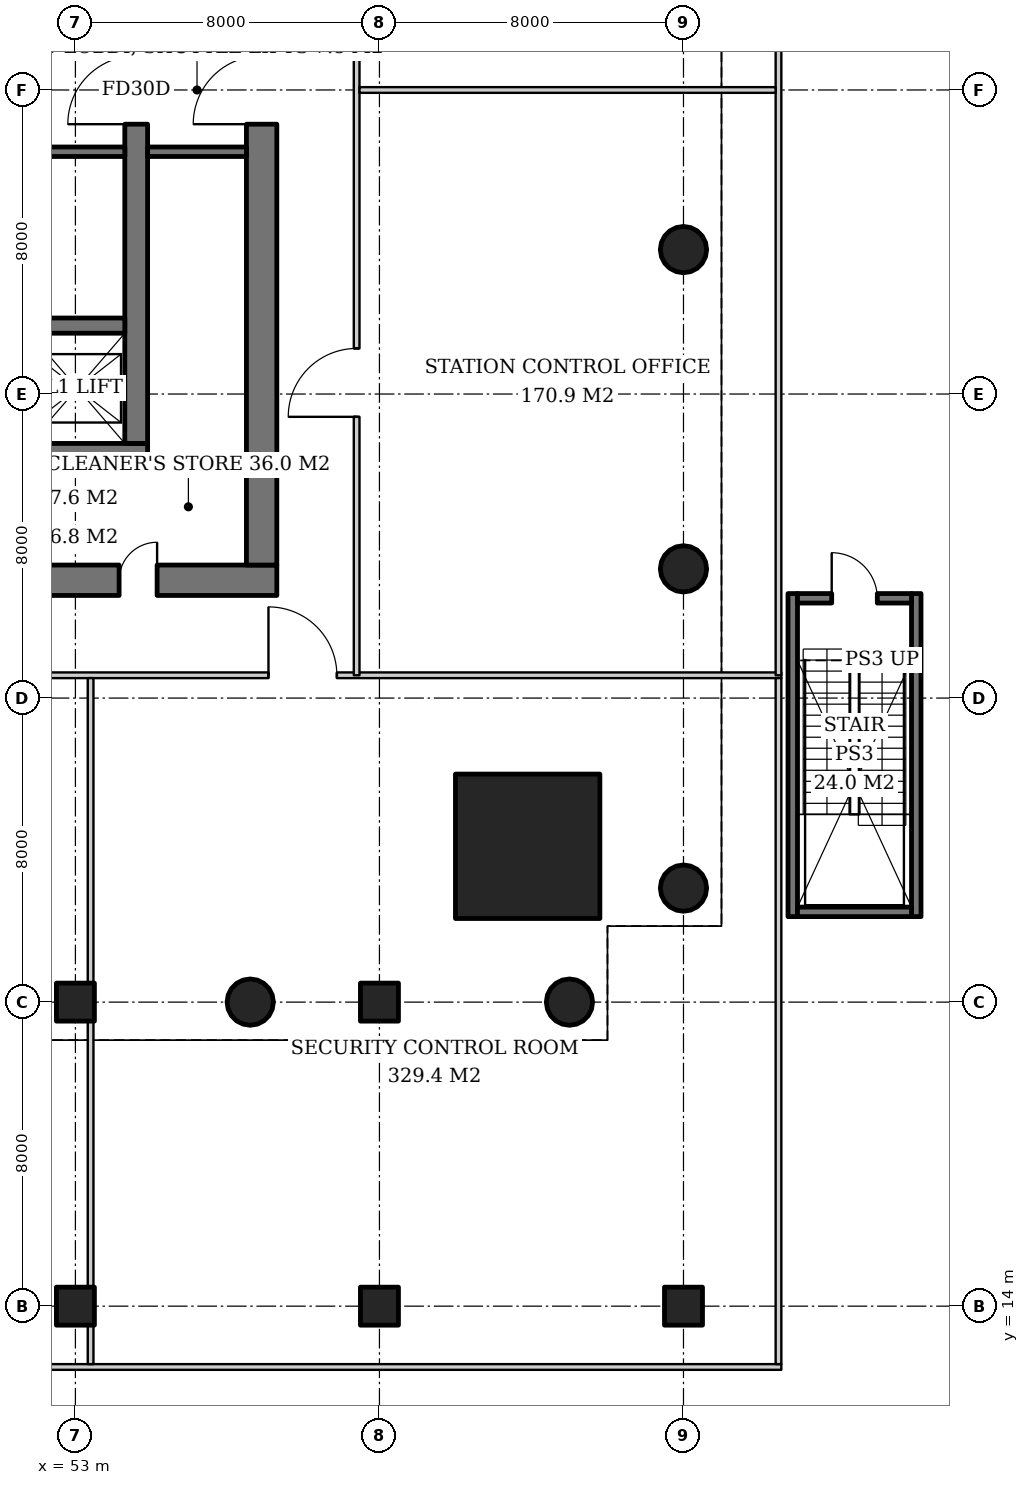
"""IFC4 building model, lengths in metres.
Left out: names, types, materials, properties, quantities, classifications, styles, units other than length and angle.
Written with IfcOpenShell. Run it as: python <this file> out.ifc"""

import sys

from ifc_helpers import new_model, si_unit, direction, frame, frame_2d, origin, origin_2d, place, context, subcontext, project, spatial, rectangle, hollow_circle, extrude, element, fill, save


model = new_model("IFC4")
c1 = context("Model", 3, precision=1e-05, world=origin(), true_north=direction((0.0, 1.0)))
c2 = subcontext(c1, "Body", "Model", "MODEL_VIEW")
j1 = project(units=[si_unit("LENGTHUNIT", "METRE"), si_unit("PLANEANGLEUNIT", "RADIAN")], contexts=[c1])
p1 = place(None, origin())
s1 = spatial("IfcSite", under=j1, at=p1, CompositionType="ELEMENT")
p2 = place(p1, origin())
s2 = spatial("IfcBuilding", under=s1, at=p2, CompositionType="ELEMENT")
p3 = place(p2, frame((0.0, 0.0, -5.0)))
s3 = spatial("IfcBuildingStorey", under=s2, at=p3, CompositionType="ELEMENT", Elevation=-5.0)
for number, where, z_axis, x_axis in (
    (1, (53.0, 14.0, 0.0), (0.0, 0.0, 1.0), (1.0, 0.0, 0.0)),
    (2, (61.0, 14.0, 0.0), (0.0, 0.0, 1.0), (1.0, 0.0, 0.0)),
    (3, (69.0, 14.0, 0.0), (0.0, 0.0, 1.0), (1.0, 0.0, 0.0)),
):
    element("IfcColumn", number, at=place(p3, frame(where, z_axis=z_axis, x_axis=x_axis)), inside=s3, PredefinedType="COLUMN", context=c2, shape_type="SweptSolid", body=[
        extrude(rectangle(XDim=1.0, YDim=1.0, at=origin_2d()), origin(), (0.0, 0.0, 1.0), 5.0),
    ])
for number, where, z_axis, x_axis in (
    (4, (69.0, 25.0, 0.0), (0.0, 0.0, 1.0), (1.0, 0.0, 0.0)),
    (5, (69.0, 33.4, 0.0), (0.0, 0.0, 1.0), (1.0, 0.0, 0.0)),
    (6, (69.0, 41.8, 0.0), (0.0, 0.0, 1.0), (1.0, 0.0, 0.0)),
):
    element("IfcColumn", number, at=place(p3, frame(where, z_axis=z_axis, x_axis=x_axis)), inside=s3, PredefinedType="COLUMN", context=c2, shape_type="SweptSolid", body=[
        extrude(hollow_circle(Radius=0.61, WallThickness=0.04, at=origin_2d()), origin(), (0.0, 0.0, 1.0), 5.0),
    ])
p4 = place(p3, frame((64.9, 26.1, 0.0), z_axis=(0.0, 0.0, 1.0), x_axis=(1.0, 0.0, 0.0)))
e7 = element("IfcColumn", 7, at=p4, inside=s3, PredefinedType="COLUMN", context=c2, shape_type="SweptSolid", body=[
    extrude(rectangle(XDim=3.8, YDim=3.8, at=origin_2d()), origin(), (0.0, 0.0, 1.0), 5.0),
])
for number, where, z_axis, x_axis in (
    (8, (66.0, 22.0, 0.0), (0.0, 0.0, 1.0), (1.0, 0.0, 0.0)),
    (9, (57.6, 22.0, 0.0), (0.0, 0.0, 1.0), (1.0, 0.0, 0.0)),
):
    element("IfcColumn", number, at=place(p3, frame(where, z_axis=z_axis, x_axis=x_axis)), inside=s3, PredefinedType="COLUMN", context=c2, shape_type="SweptSolid", body=[
        extrude(hollow_circle(Radius=0.61, WallThickness=0.04, at=origin_2d()), origin(), (0.0, 0.0, 1.0), 5.0),
    ])
p5 = place(p3, frame((35.1, 36.4, 0.0), z_axis=(0.0, 0.0, 1.0), x_axis=(1.0, 0.0, 0.0)))
e10 = element("IfcWall", 10, at=p5, inside=s3, PredefinedType="SHEAR", context=c2, shape_type="SweptSolid", body=[
    extrude(rectangle(XDim=19.8, YDim=0.6, at=frame_2d((9.9, 0.0))), origin(), (0.0, 0.0, 1.0), 5.0),
])
p6 = place(p5, frame((3.9, 0.0, 0.0)))
e11 = element("IfcOpeningElement", 11, at=p6, cuts=e10, PredefinedType="OPENING", context=c2, shape_type="SweptSolid", body=[
    extrude(rectangle(XDim=1.0, YDim=2.1, at=frame_2d((0.5, 1.05))), frame((0.0, 0.31, 0.0), z_axis=(0.0, -1.0, 0.0), x_axis=(1.0, 0.0, 0.0)), (0.0, 0.0, 1.0), 0.62),
])
p7 = place(p5, frame((15.35, 0.0, 0.0)))
e12 = element("IfcOpeningElement", 12, at=p7, cuts=e10, PredefinedType="OPENING", context=c2, shape_type="SweptSolid", body=[
    extrude(rectangle(XDim=1.0, YDim=2.1, at=frame_2d((0.5, 1.05))), frame((0.0, 0.31, 0.0), z_axis=(0.0, -1.0, 0.0), x_axis=(1.0, 0.0, 0.0)), (0.0, 0.0, 1.0), 0.62),
])
p8 = place(p3, frame((54.6, 36.7, 0.0), z_axis=(0.0, 0.0, 1.0), x_axis=(0.0, 1.0, 0.0)))
e13 = element("IfcWall", 13, at=p8, inside=s3, PredefinedType="SHEAR", context=c2, shape_type="SweptSolid", body=[
    extrude(rectangle(XDim=18.6, YDim=0.6, at=frame_2d((9.3, 0.0))), origin(), (0.0, 0.0, 1.0), 5.0),
])
p9 = place(p8, frame((8.4, 0.0, 0.0)))
e14 = element("IfcOpeningElement", 14, at=p9, cuts=e13, PredefinedType="OPENING", context=c2, shape_type="SweptSolid", body=[
    extrude(rectangle(XDim=1.8, YDim=2.4, at=frame_2d((0.9, 1.2))), frame((0.0, 0.31, 0.0), z_axis=(0.0, -1.0, 0.0), x_axis=(1.0, 0.0, 0.0)), (0.0, 0.0, 1.0), 0.62),
])
p10 = place(p3, frame((31.7, 33.1, 0.0), z_axis=(0.0, 0.0, 1.0), x_axis=(1.0, 0.0, 0.0)))
e15 = element("IfcWall", 15, at=p10, inside=s3, PredefinedType="SHEAR", context=c2, shape_type="SweptSolid", body=[
    extrude(rectangle(XDim=26.6, YDim=0.8, at=frame_2d((13.3, 0.0))), origin(), (0.0, 0.0, 1.0), 5.0),
])
p11 = place(p10, frame((7.3, 0.0, 0.0)))
e16 = element("IfcOpeningElement", 16, at=p11, cuts=e15, PredefinedType="OPENING", context=c2, shape_type="SweptSolid", body=[
    extrude(rectangle(XDim=1.0, YDim=2.1, at=frame_2d((0.5, 1.05))), frame((0.0, 0.41, 0.0), z_axis=(0.0, -1.0, 0.0), x_axis=(1.0, 0.0, 0.0)), (0.0, 0.0, 1.0), 0.82),
])
p12 = place(p10, frame((18.75, 0.0, 0.0)))
e17 = element("IfcOpeningElement", 17, at=p12, cuts=e15, PredefinedType="OPENING", context=c2, shape_type="SweptSolid", body=[
    extrude(rectangle(XDim=1.0, YDim=2.1, at=frame_2d((0.5, 1.05))), frame((0.0, 0.41, 0.0), z_axis=(0.0, -1.0, 0.0), x_axis=(1.0, 0.0, 0.0)), (0.0, 0.0, 1.0), 0.82),
])
p13 = place(p10, frame((3.25, 0.0, 0.0)))
e18 = element("IfcOpeningElement", 18, at=p13, cuts=e15, PredefinedType="OPENING", context=c2, shape_type="SweptSolid", body=[
    extrude(rectangle(XDim=1.0, YDim=2.1, at=frame_2d((0.5, 1.05))), frame((0.0, 0.41, 0.0), z_axis=(0.0, -1.0, 0.0), x_axis=(1.0, 0.0, 0.0)), (0.0, 0.0, 1.0), 0.82),
])
p14 = place(p10, frame((10.42, 0.0, 0.0)))
e19 = element("IfcOpeningElement", 19, at=p14, cuts=e15, PredefinedType="OPENING", context=c2, shape_type="SweptSolid", body=[
    extrude(rectangle(XDim=1.0, YDim=2.1, at=frame_2d((0.5, 1.05))), frame((0.0, 0.41, 0.0), z_axis=(0.0, -1.0, 0.0), x_axis=(1.0, 0.0, 0.0)), (0.0, 0.0, 1.0), 0.82),
])
p15 = place(p10, frame((14.46, 0.0, 0.0)))
e20 = element("IfcOpeningElement", 20, at=p15, cuts=e15, PredefinedType="OPENING", context=c2, shape_type="SweptSolid", body=[
    extrude(rectangle(XDim=1.0, YDim=2.1, at=frame_2d((0.5, 1.05))), frame((0.0, 0.41, 0.0), z_axis=(0.0, -1.0, 0.0), x_axis=(1.0, 0.0, 0.0)), (0.0, 0.0, 1.0), 0.82),
])
p16 = place(p10, frame((22.45, 0.0, 0.0)))
e21 = element("IfcOpeningElement", 21, at=p16, cuts=e15, PredefinedType="OPENING", context=c2, shape_type="SweptSolid", body=[
    extrude(rectangle(XDim=1.0, YDim=2.1, at=frame_2d((0.5, 1.05))), frame((0.0, 0.41, 0.0), z_axis=(0.0, -1.0, 0.0), x_axis=(1.0, 0.0, 0.0)), (0.0, 0.0, 1.0), 0.82),
])
p17 = place(p3, frame((57.9, 33.5, 0.0), z_axis=(0.0, 0.0, 1.0), x_axis=(0.0, 1.0, 0.0)))
e22 = element("IfcWall", 22, at=p17, inside=s3, PredefinedType="SHEAR", context=c2, shape_type="SweptSolid", body=[
    extrude(rectangle(XDim=25.0, YDim=0.8, at=frame_2d((12.5, 0.0))), origin(), (0.0, 0.0, 1.0), 5.0),
])
p18 = place(p17, frame((11.6, 0.0, 0.0)))
e23 = element("IfcOpeningElement", 23, at=p18, cuts=e22, PredefinedType="OPENING", context=c2, shape_type="SweptSolid", body=[
    extrude(rectangle(XDim=1.8, YDim=2.4, at=frame_2d((0.9, 1.2))), frame((0.0, 0.41, 0.0), z_axis=(0.0, -1.0, 0.0), x_axis=(1.0, 0.0, 0.0)), (0.0, 0.0, 1.0), 0.82),
])
p19 = place(p3, frame((35.7, 39.8, 0.0), z_axis=(0.0, 0.0, 1.0), x_axis=(1.0, 0.0, 0.0)))
e24 = element("IfcWall", 24, at=p19, inside=s3, PredefinedType="SHEAR", context=c2, shape_type="SweptSolid", body=[
    extrude(rectangle(XDim=18.6, YDim=0.4, at=frame_2d((9.3, 0.0))), origin(), (0.0, 0.0, 1.0), 5.0),
])
for number, where, z_axis, x_axis in (
    (25, (53.0, 22.0, 0.0), (0.0, 0.0, 1.0), (1.0, 0.0, 0.0)),
    (26, (61.0, 22.0, 0.0), (0.0, 0.0, 1.0), (1.0, 0.0, 0.0)),
):
    element("IfcColumn", number, at=place(p3, frame(where, z_axis=z_axis, x_axis=x_axis)), inside=s3, PredefinedType="COLUMN", context=c2, shape_type="SweptSolid", body=[
        extrude(rectangle(XDim=1.0, YDim=1.0, at=origin_2d()), origin(), (0.0, 0.0, 1.0), 5.0),
    ])
p20 = place(p3, frame((48.93, 44.375, 0.0), z_axis=(0.0, 0.0, 1.0), x_axis=(1.0, 0.0, 0.0)))
e27 = element("IfcWall", 27, at=p20, inside=s3, PredefinedType="SHEAR", context=c2, shape_type="SweptSolid", body=[
    extrude(rectangle(XDim=5.37, YDim=0.25, at=frame_2d((2.685, 0.0))), origin(), (0.0, 0.0, 1.0), 5.0),
])
p21 = place(p3, frame((54.9, 44.375, 0.0), z_axis=(0.0, 0.0, 1.0), x_axis=(1.0, 0.0, 0.0)))
e28 = element("IfcWall", 28, at=p21, inside=s3, PredefinedType="SOLIDWALL", context=c2, shape_type="SweptSolid", body=[
    extrude(rectangle(XDim=2.6, YDim=0.25, at=frame_2d((1.3, 0.0))), origin(), (0.0, 0.0, 1.0), 4.7),
])
for number, where, z_axis, x_axis in (
    (29, (71.875, 24.25, 0.0), (0.0, 0.0, 1.0), (0.0, 1.0, 0.0)),
    (30, (75.125, 24.25, 0.0), (0.0, 0.0, 1.0), (0.0, 1.0, 0.0)),
):
    element("IfcWall", number, at=place(p3, frame(where, z_axis=z_axis, x_axis=x_axis)), inside=s3, PredefinedType="SOLIDWALL", context=c2, shape_type="SweptSolid", body=[
        extrude(rectangle(XDim=8.5, YDim=0.25, at=frame_2d((4.25, 0.0))), origin(), (0.0, 0.0, 1.0), 4.6),
    ])
p22 = place(p3, frame((72.0, 24.375, 0.0), z_axis=(0.0, 0.0, 1.0), x_axis=(1.0, 0.0, 0.0)))
e31 = element("IfcWall", 31, at=p22, inside=s3, PredefinedType="SOLIDWALL", context=c2, shape_type="SweptSolid", body=[
    extrude(rectangle(XDim=3.0, YDim=0.25, at=frame_2d((1.5, 0.0))), origin(), (0.0, 0.0, 1.0), 4.6),
])
p23 = place(p3, frame((72.0, 32.625, 0.0), z_axis=(0.0, 0.0, 1.0), x_axis=(1.0, 0.0, 0.0)))
e32 = element("IfcWall", 32, at=p23, inside=s3, PredefinedType="SOLIDWALL", context=c2, shape_type="SweptSolid", body=[
    extrude(rectangle(XDim=3.0, YDim=0.25, at=frame_2d((1.5, 0.0))), origin(), (0.0, 0.0, 1.0), 4.6),
])
p24 = place(p23, frame((0.9, 0.0, 0.0)))
e33 = element("IfcOpeningElement", 33, at=p24, cuts=e32, PredefinedType="OPENING", context=c2, shape_type="SweptSolid", body=[
    extrude(rectangle(XDim=1.2, YDim=2.1, at=frame_2d((0.6, 1.05))), frame((0.0, 0.135, 0.0), z_axis=(0.0, -1.0, 0.0), x_axis=(1.0, 0.0, 0.0)), (0.0, 0.0, 1.0), 0.27),
])
p25 = place(p3, frame((19.075, 12.4, 0.0), z_axis=(0.0, 0.0, 1.0), x_axis=(1.0, 0.0, 0.0)))
e34 = element("IfcWall", 34, at=p25, inside=s3, PredefinedType="PARTITIONING", context=c2, shape_type="SweptSolid", body=[
    extrude(rectangle(XDim=52.5, YDim=0.15, at=frame_2d((26.25, 0.0))), origin(), (0.0, 0.0, 1.0), 4.6),
])
p26 = place(p3, frame((19.075, 30.6, 0.0), z_axis=(0.0, 0.0, 1.0), x_axis=(1.0, 0.0, 0.0)))
e35 = element("IfcWall", 35, at=p26, inside=s3, PredefinedType="PARTITIONING", context=c2, shape_type="SweptSolid", body=[
    extrude(rectangle(XDim=52.5, YDim=0.15, at=frame_2d((26.25, 0.0))), origin(), (0.0, 0.0, 1.0), 3.688),
])
p27 = place(p26, frame((11.045, 0.0, 0.0)))
e36 = element("IfcOpeningElement", 36, at=p27, cuts=e35, PredefinedType="OPENING", context=c2, shape_type="SweptSolid", body=[
    extrude(rectangle(XDim=1.8, YDim=2.4, at=frame_2d((0.9, 1.2))), frame((0.0, 0.085, 0.0), z_axis=(0.0, -1.0, 0.0), x_axis=(1.0, 0.0, 0.0)), (0.0, 0.0, 1.0), 0.17),
])
p28 = place(p26, frame((21.225, 0.0, 0.0)))
e37 = element("IfcOpeningElement", 37, at=p28, cuts=e35, PredefinedType="OPENING", context=c2, shape_type="SweptSolid", body=[
    extrude(rectangle(XDim=1.0, YDim=2.1, at=frame_2d((0.5, 1.05))), frame((0.0, 0.085, 0.0), z_axis=(0.0, -1.0, 0.0), x_axis=(1.0, 0.0, 0.0)), (0.0, 0.0, 1.0), 0.17),
])
p29 = place(p26, frame((29.225, 0.0, 0.0)))
e38 = element("IfcOpeningElement", 38, at=p29, cuts=e35, PredefinedType="OPENING", context=c2, shape_type="SweptSolid", body=[
    extrude(rectangle(XDim=1.8, YDim=2.4, at=frame_2d((0.9, 1.2))), frame((0.0, 0.085, 0.0), z_axis=(0.0, -1.0, 0.0), x_axis=(1.0, 0.0, 0.0)), (0.0, 0.0, 1.0), 0.17),
])
p30 = place(p26, frame((39.005, 0.0, 0.0)))
e39 = element("IfcOpeningElement", 39, at=p30, cuts=e35, PredefinedType="OPENING", context=c2, shape_type="SweptSolid", body=[
    extrude(rectangle(XDim=1.8, YDim=2.4, at=frame_2d((0.9, 1.2))), frame((0.0, 0.085, 0.0), z_axis=(0.0, -1.0, 0.0), x_axis=(1.0, 0.0, 0.0)), (0.0, 0.0, 1.0), 0.17),
])
p31 = place(p3, frame((71.5, 12.475, 0.0), z_axis=(0.0, 0.0, 1.0), x_axis=(0.0, 1.0, 0.0)))
e40 = element("IfcWall", 40, at=p31, inside=s3, PredefinedType="PARTITIONING", context=c2, shape_type="SweptSolid", body=[
    extrude(rectangle(XDim=18.05, YDim=0.15, at=frame_2d((9.025, 0.0))), origin(), (0.0, 0.0, 1.0), 4.6),
])
p32 = place(p3, frame((53.4, 12.475, 0.0), z_axis=(0.0, 0.0, 1.0), x_axis=(0.0, 1.0, 0.0)))
e41 = element("IfcWall", 41, at=p32, inside=s3, PredefinedType="PARTITIONING", context=c2, shape_type="SweptSolid", body=[
    extrude(rectangle(XDim=1.025, YDim=0.15, at=frame_2d((0.512, 0.0))), origin(), (0.0, 0.0, 1.0), 4.6),
])
p33 = place(p3, frame((53.4, 14.5, 0.0), z_axis=(0.0, 0.0, 1.0), x_axis=(0.0, 1.0, 0.0)))
e42 = element("IfcWall", 42, at=p33, inside=s3, PredefinedType="PARTITIONING", context=c2, shape_type="SweptSolid", body=[
    extrude(rectangle(XDim=7.0, YDim=0.15, at=frame_2d((3.5, 0.0))), origin(), (0.0, 0.0, 1.0), 4.6),
])
p34 = place(p3, frame((53.4, 22.5, 0.0), z_axis=(0.0, 0.0, 1.0), x_axis=(0.0, 1.0, 0.0)))
e43 = element("IfcWall", 43, at=p34, inside=s3, PredefinedType="PARTITIONING", context=c2, shape_type="SweptSolid", body=[
    extrude(rectangle(XDim=8.025, YDim=0.15, at=frame_2d((4.012, 0.0))), origin(), (0.0, 0.0, 1.0), 4.7),
])
p35 = place(p3, frame((60.4, 30.6, 0.0), z_axis=(0.0, 0.0, 1.0), x_axis=(0.0, 1.0, 0.0)))
e44 = element("IfcWall", 44, at=p35, inside=s3, PredefinedType="PARTITIONING", context=c2, shape_type="SweptSolid", body=[
    extrude(rectangle(XDim=30.875, YDim=0.15, at=frame_2d((15.438, 0.0))), origin(), (0.0, 0.0, 1.0), 3.688),
])
p36 = place(p35, frame((6.8, 0.0, 0.0)))
e45 = element("IfcOpeningElement", 45, at=p36, cuts=e44, PredefinedType="OPENING", context=c2, shape_type="SweptSolid", body=[
    extrude(rectangle(XDim=1.8, YDim=2.4, at=frame_2d((0.9, 1.2))), frame((0.0, 0.085, 0.0), z_axis=(0.0, -1.0, 0.0), x_axis=(1.0, 0.0, 0.0)), (0.0, 0.0, 1.0), 0.17),
])
p37 = place(p35, frame((22.2, 0.0, 0.0)))
e46 = element("IfcOpeningElement", 46, at=p37, cuts=e44, PredefinedType="OPENING", context=c2, shape_type="SweptSolid", body=[
    extrude(rectangle(XDim=1.8, YDim=2.4, at=frame_2d((0.9, 1.2))), frame((0.0, 0.085, 0.0), z_axis=(0.0, -1.0, 0.0), x_axis=(1.0, 0.0, 0.0)), (0.0, 0.0, 1.0), 0.17),
])
p38 = place(p3, frame((71.5, 30.6, 0.0), z_axis=(0.0, 0.0, 1.0), x_axis=(0.0, 1.0, 0.0)))
e47 = element("IfcWall", 47, at=p38, inside=s3, PredefinedType="PARTITIONING", context=c2, shape_type="SweptSolid", body=[
    extrude(rectangle(XDim=30.875, YDim=0.15, at=frame_2d((15.438, 0.0))), origin(), (0.0, 0.0, 1.0), 4.6),
])
p39 = place(p3, frame((60.475, 46.0, 0.0), z_axis=(0.0, 0.0, 1.0), x_axis=(1.0, 0.0, 0.0)))
e48 = element("IfcWall", 48, at=p39, inside=s3, PredefinedType="PARTITIONING", context=c2, shape_type="SweptSolid", body=[
    extrude(rectangle(XDim=10.95, YDim=0.15, at=frame_2d((5.475, 0.0))), origin(), (0.0, 0.0, 1.0), 4.1),
])
p40 = place(p9, origin())
e49 = element("IfcDoor", 49, at=p40, inside=s3, OperationType="DOUBLE_DOOR_SINGLE_SWING", PredefinedType="DOOR", context=c2, shape_type="SweptSolid", body=[
    extrude(rectangle(XDim=1.8, YDim=2.4, at=frame_2d((0.9, 1.2))), frame((0.0, 0.025, 0.0), z_axis=(0.0, -1.0, 0.0), x_axis=(1.0, 0.0, 0.0)), (0.0, 0.0, 1.0), 0.05),
])
fill(e14, e49)
p41 = place(p18, origin())
e50 = element("IfcDoor", 50, at=p41, inside=s3, OperationType="DOUBLE_DOOR_SINGLE_SWING", PredefinedType="DOOR", context=c2, shape_type="SweptSolid", body=[
    extrude(rectangle(XDim=1.8, YDim=2.4, at=frame_2d((0.9, 1.2))), frame((0.0, 0.025, 0.0), z_axis=(0.0, -1.0, 0.0), x_axis=(1.0, 0.0, 0.0)), (0.0, 0.0, 1.0), 0.05),
])
fill(e23, e50)
p42 = place(p16, origin())
e51 = element("IfcDoor", 51, at=p42, inside=s3, OperationType="SINGLE_SWING_RIGHT", PredefinedType="DOOR", context=c2, shape_type="SweptSolid", body=[
    extrude(rectangle(XDim=1.0, YDim=2.1, at=frame_2d((0.5, 1.05))), frame((0.0, 0.39, 0.0), z_axis=(0.0, -1.0, 0.0), x_axis=(1.0, 0.0, 0.0)), (0.0, 0.0, 1.0), 0.05),
])
fill(e21, e51)
p43 = place(p24, origin())
e52 = element("IfcDoor", 52, at=p43, inside=s3, OperationType="SINGLE_SWING_LEFT", PredefinedType="DOOR", context=c2, shape_type="SweptSolid", body=[
    extrude(rectangle(XDim=1.2, YDim=2.1, at=frame_2d((0.6, 1.05))), frame((0.0, 0.025, 0.0), z_axis=(0.0, -1.0, 0.0), x_axis=(1.0, 0.0, 0.0)), (0.0, 0.0, 1.0), 0.05),
])
fill(e33, e52)
p44 = place(p30, origin())
e53 = element("IfcDoor", 53, at=p44, inside=s3, OperationType="DOUBLE_DOOR_SINGLE_SWING", PredefinedType="DOOR", context=c2, shape_type="SweptSolid", body=[
    extrude(rectangle(XDim=1.8, YDim=2.4, at=frame_2d((0.9, 1.2))), frame((0.0, 0.025, 0.0), z_axis=(0.0, -1.0, 0.0), x_axis=(1.0, 0.0, 0.0)), (0.0, 0.0, 1.0), 0.05),
])
fill(e39, e53)
p45 = place(p36, origin())
e54 = element("IfcDoor", 54, at=p45, inside=s3, OperationType="DOUBLE_DOOR_SINGLE_SWING", PredefinedType="DOOR", context=c2, shape_type="SweptSolid", body=[
    extrude(rectangle(XDim=1.8, YDim=2.4, at=frame_2d((0.9, 1.2))), frame((0.0, 0.025, 0.0), z_axis=(0.0, -1.0, 0.0), x_axis=(1.0, 0.0, 0.0)), (0.0, 0.0, 1.0), 0.05),
])
fill(e45, e54)
save(model, sys.argv[1])
